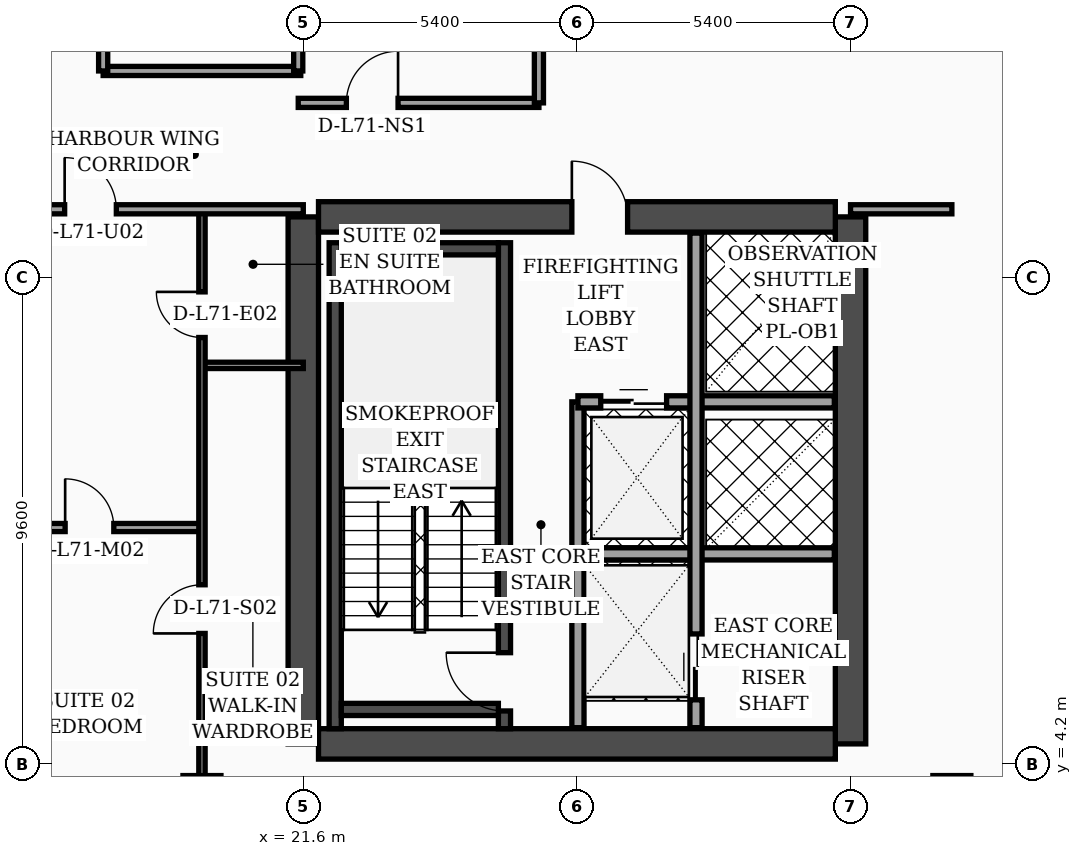
"""IFC4 building model, lengths in metres.
Left out: names, types, materials, properties, quantities, classifications, styles, units other than length and angle.
Written with IfcOpenShell. Run it as: python <this file> out.ifc"""

import sys

from ifc_helpers import new_model, si_unit, direction, frame, frame_2d, origin, origin_2d, place, context, subcontext, project, spatial, rectangle, hollow_rectangle, extrude, element, fill, save


model = new_model("IFC4")
c1 = context("Model", 3, precision=1e-05, world=origin(), true_north=direction((0.0, 1.0)))
c2 = subcontext(c1, "Body", "Model", "MODEL_VIEW")
j1 = project(units=[si_unit("LENGTHUNIT", "METRE"), si_unit("PLANEANGLEUNIT", "RADIAN")], contexts=[c1])
p1 = place(None, origin())
s1 = spatial("IfcSite", under=j1, at=p1, CompositionType="ELEMENT")
p2 = place(p1, origin())
s2 = spatial("IfcBuilding", under=s1, at=p2, CompositionType="ELEMENT")
p3 = place(p2, frame((0.0, 0.0, 287.3)))
s3 = spatial("IfcBuildingStorey", under=s2, at=p3, CompositionType="ELEMENT", Elevation=287.3)
for number, where, z_axis, x_axis in (
    (1, (21.6, 4.6, 0.0), (0.0, 0.0, 1.0), (0.0, 1.0, 0.0)),
    (2, (32.4, 4.6, 0.0), (0.0, 0.0, 1.0), (0.0, 1.0, 0.0)),
):
    element("IfcWall", number, at=place(p3, frame(where, z_axis=z_axis, x_axis=x_axis)), inside=s3, PredefinedType="SHEAR", context=c2, shape_type="SweptSolid", body=[
        extrude(rectangle(XDim=10.4, YDim=0.6, at=frame_2d((5.2, 0.0))), origin(), (0.0, 0.0, 1.0), 3.56),
    ])
p4 = place(p3, frame((21.9, 15.0, 0.0), z_axis=(0.0, 0.0, 1.0), x_axis=(1.0, 0.0, 0.0)))
e3 = element("IfcWall", 3, at=p4, inside=s3, PredefinedType="SHEAR", context=c2, shape_type="SweptSolid", body=[
    extrude(rectangle(XDim=10.2, YDim=0.6, at=frame_2d((5.1, 0.0))), origin(), (0.0, 0.0, 1.0), 3.56),
])
p5 = place(p4, frame((5.0, 0.0, 0.0)))
e4 = element("IfcOpeningElement", 4, at=p5, cuts=e3, PredefinedType="OPENING", context=c2, shape_type="SweptSolid", body=[
    extrude(rectangle(XDim=1.1, YDim=2.2, at=frame_2d((0.55, 1.1))), frame((0.0, 0.31, 0.0), z_axis=(0.0, -1.0, 0.0), x_axis=(1.0, 0.0, 0.0)), (0.0, 0.0, 1.0), 0.62),
])
p6 = place(p3, frame((21.9, 4.6, 0.0), z_axis=(0.0, 0.0, 1.0), x_axis=(1.0, 0.0, 0.0)))
e5 = element("IfcWall", 5, at=p6, inside=s3, PredefinedType="SHEAR", context=c2, shape_type="SweptSolid", body=[
    extrude(rectangle(XDim=10.2, YDim=0.6, at=frame_2d((5.1, 0.0))), origin(), (0.0, 0.0, 1.0), 3.56),
])
p7 = place(p3, frame((22.23, 4.9, 0.0), z_axis=(0.0, 0.0, 1.0), x_axis=(0.0, 1.0, 0.0)))
e6 = element("IfcWall", 6, at=p7, inside=s3, PredefinedType="SOLIDWALL", context=c2, shape_type="SweptSolid", body=[
    extrude(rectangle(XDim=9.59, YDim=0.24, at=frame_2d((4.795, 0.0))), origin(), (0.0, 0.0, 1.0), 3.56),
])
p8 = place(p3, frame((25.57, 4.9, 0.0), z_axis=(0.0, 0.0, 1.0), x_axis=(0.0, 1.0, 0.0)))
e7 = element("IfcWall", 7, at=p8, inside=s3, PredefinedType="SOLIDWALL", context=c2, shape_type="SweptSolid", body=[
    extrude(rectangle(XDim=9.59, YDim=0.24, at=frame_2d((4.795, 0.0))), origin(), (0.0, 0.0, 1.0), 3.56),
])
p9 = place(p8, frame((0.35, 0.0, 0.0)))
e8 = element("IfcOpeningElement", 8, at=p9, cuts=e7, PredefinedType="OPENING", context=c2, shape_type="SweptSolid", body=[
    extrude(rectangle(XDim=1.15, YDim=2.2, at=frame_2d((0.575, 1.1))), frame((0.0, 0.13, 0.0), z_axis=(0.0, -1.0, 0.0), x_axis=(1.0, 0.0, 0.0)), (0.0, 0.0, 1.0), 0.26),
])
for number, where, z_axis, x_axis in (
    (9, (22.35, 5.28, 0.0), (0.0, 0.0, 1.0), (1.0, 0.0, 0.0)),
    (10, (22.35, 14.37, 0.0), (0.0, 0.0, 1.0), (1.0, 0.0, 0.0)),
):
    element("IfcWall", number, at=place(p3, frame(where, z_axis=z_axis, x_axis=x_axis)), inside=s3, PredefinedType="SOLIDWALL", context=c2, shape_type="SweptSolid", body=[
        extrude(rectangle(XDim=3.1, YDim=0.24, at=frame_2d((1.55, 0.0))), origin(), (0.0, 0.0, 1.0), 3.56),
    ])
for number, where, z_axis, x_axis in (
    (11, (19.6, 3.6, 0.0), (0.0, 0.0, 1.0), (1.0, 0.0, 0.0)),
    (12, (34.4, 3.6, 0.0), (0.0, 0.0, 1.0), (1.0, 0.0, 0.0)),
):
    element("IfcColumn", number, at=place(p3, frame(where, z_axis=z_axis, x_axis=x_axis)), inside=s3, PredefinedType="COLUMN", context=c2, shape_type="SweptSolid", body=[
        extrude(hollow_rectangle(XDim=0.75, YDim=0.75, WallThickness=0.032, at=origin_2d()), origin(), (0.0, 0.0, 1.0), 3.56),
    ])
p10 = place(p3, frame((41.03, 5.505, 0.0), z_axis=(0.0, 0.0, 1.0), x_axis=(-0.300509063924, 0.953778958931, 0.0)))
e13 = element("IfcWall", 13, at=p10, inside=s3, PredefinedType="SOLIDWALL", context=c2, shape_type="SweptSolid", body=[
    extrude(rectangle(XDim=30.814, YDim=0.32, at=frame_2d((15.407, 0.0))), origin(), (0.0, 0.0, 1.0), 3.56),
])
p11 = place(p10, frame((8.9, 0.0, 0.0)))
e14 = element("IfcOpeningElement", 14, at=p11, cuts=e13, PredefinedType="OPENING", context=c2, shape_type="SweptSolid", body=[
    extrude(rectangle(XDim=1.4, YDim=2.25, at=frame_2d((0.7, 1.125))), frame((0.0, 0.17, 0.0), z_axis=(0.0, -1.0, 0.0), x_axis=(1.0, 0.0, 0.0)), (0.0, 0.0, 1.0), 0.34),
])
p12 = place(p10, frame((4.437, 0.0, 0.7)))
e15 = element("IfcOpeningElement", 15, at=p12, cuts=e13, PredefinedType="OPENING", context=c2, shape_type="SweptSolid", body=[
    extrude(rectangle(XDim=1.6, YDim=1.65, at=frame_2d((0.8, 0.825))), frame((0.0, 0.17, 0.0), z_axis=(0.0, -1.0, 0.0), x_axis=(1.0, 0.0, 0.0)), (0.0, 0.0, 1.0), 0.34),
])
p13 = place(p10, frame((18.696, 0.0, 0.7)))
e16 = element("IfcOpeningElement", 16, at=p13, cuts=e13, PredefinedType="OPENING", context=c2, shape_type="SweptSolid", body=[
    extrude(rectangle(XDim=1.6, YDim=1.65, at=frame_2d((0.8, 0.825))), frame((0.0, 0.17, 0.0), z_axis=(0.0, -1.0, 0.0), x_axis=(1.0, 0.0, 0.0)), (0.0, 0.0, 1.0), 0.34),
])
p14 = place(p10, frame((1.6, 0.0, 0.75)))
e17 = element("IfcOpeningElement", 17, at=p14, cuts=e13, PredefinedType="OPENING", context=c2, shape_type="SweptSolid", body=[
    extrude(rectangle(XDim=1.5, YDim=1.6, at=frame_2d((0.75, 0.8))), frame((0.0, 0.17, 0.0), z_axis=(0.0, -1.0, 0.0), x_axis=(1.0, 0.0, 0.0)), (0.0, 0.0, 1.0), 0.34),
])
p15 = place(p10, frame((6.75, 0.0, 0.75)))
e18 = element("IfcOpeningElement", 18, at=p15, cuts=e13, PredefinedType="OPENING", context=c2, shape_type="SweptSolid", body=[
    extrude(rectangle(XDim=1.5, YDim=1.6, at=frame_2d((0.75, 0.8))), frame((0.0, 0.17, 0.0), z_axis=(0.0, -1.0, 0.0), x_axis=(1.0, 0.0, 0.0)), (0.0, 0.0, 1.0), 0.34),
])
p16 = place(p10, frame((10.9, 0.0, 0.75)))
e19 = element("IfcOpeningElement", 19, at=p16, cuts=e13, PredefinedType="OPENING", context=c2, shape_type="SweptSolid", body=[
    extrude(rectangle(XDim=1.5, YDim=1.6, at=frame_2d((0.75, 0.8))), frame((0.0, 0.17, 0.0), z_axis=(0.0, -1.0, 0.0), x_axis=(1.0, 0.0, 0.0)), (0.0, 0.0, 1.0), 0.34),
])
p17 = place(p10, frame((14.0, 0.0, 0.75)))
e20 = element("IfcOpeningElement", 20, at=p17, cuts=e13, PredefinedType="OPENING", context=c2, shape_type="SweptSolid", body=[
    extrude(rectangle(XDim=1.5, YDim=1.6, at=frame_2d((0.75, 0.8))), frame((0.0, 0.17, 0.0), z_axis=(0.0, -1.0, 0.0), x_axis=(1.0, 0.0, 0.0)), (0.0, 0.0, 1.0), 0.34),
])
p18 = place(p10, frame((16.55, 0.0, 0.75)))
e21 = element("IfcOpeningElement", 21, at=p18, cuts=e13, PredefinedType="OPENING", context=c2, shape_type="SweptSolid", body=[
    extrude(rectangle(XDim=1.5, YDim=1.6, at=frame_2d((0.75, 0.8))), frame((0.0, 0.17, 0.0), z_axis=(0.0, -1.0, 0.0), x_axis=(1.0, 0.0, 0.0)), (0.0, 0.0, 1.0), 0.34),
])
p19 = place(p10, frame((20.75, 0.0, 0.75)))
e22 = element("IfcOpeningElement", 22, at=p19, cuts=e13, PredefinedType="OPENING", context=c2, shape_type="SweptSolid", body=[
    extrude(rectangle(XDim=1.5, YDim=1.6, at=frame_2d((0.75, 0.8))), frame((0.0, 0.17, 0.0), z_axis=(0.0, -1.0, 0.0), x_axis=(1.0, 0.0, 0.0)), (0.0, 0.0, 1.0), 0.34),
])
p20 = place(p10, frame((23.3, 0.0, 0.75)))
e23 = element("IfcOpeningElement", 23, at=p20, cuts=e13, PredefinedType="OPENING", context=c2, shape_type="SweptSolid", body=[
    extrude(rectangle(XDim=1.5, YDim=1.6, at=frame_2d((0.75, 0.8))), frame((0.0, 0.17, 0.0), z_axis=(0.0, -1.0, 0.0), x_axis=(1.0, 0.0, 0.0)), (0.0, 0.0, 1.0), 0.34),
])
p21 = place(p10, frame((26.4, 0.0, 0.75)))
e24 = element("IfcOpeningElement", 24, at=p21, cuts=e13, PredefinedType="OPENING", context=c2, shape_type="SweptSolid", body=[
    extrude(rectangle(XDim=1.5, YDim=1.6, at=frame_2d((0.75, 0.8))), frame((0.0, 0.17, 0.0), z_axis=(0.0, -1.0, 0.0), x_axis=(1.0, 0.0, 0.0)), (0.0, 0.0, 1.0), 0.34),
])
p22 = place(p3, frame((27.02, 4.92, 0.0), z_axis=(0.0, 0.0, 1.0), x_axis=(0.0, 1.0, 0.0)))
e25 = element("IfcWall", 25, at=p22, inside=s3, PredefinedType="SOLIDWALL", context=c2, shape_type="SweptSolid", body=[
    extrude(rectangle(XDim=6.43, YDim=0.24, at=frame_2d((3.215, 0.0))), origin(), (0.0, 0.0, 1.0), 3.56),
])
p23 = place(p3, frame((27.02, 11.35, 0.0), z_axis=(0.0, 0.0, 1.0), x_axis=(1.0, 0.0, 0.0)))
e26 = element("IfcWall", 26, at=p23, inside=s3, PredefinedType="SOLIDWALL", context=c2, shape_type="SweptSolid", body=[
    extrude(rectangle(XDim=5.06, YDim=0.24, at=frame_2d((2.53, 0.0))), origin(), (0.0, 0.0, 1.0), 3.56),
])
p24 = place(p23, frame((0.45, 0.0, 0.0)))
e27 = element("IfcOpeningElement", 27, at=p24, cuts=e26, PredefinedType="OPENING", context=c2, shape_type="SweptSolid", body=[
    extrude(rectangle(XDim=1.3, YDim=2.35, at=frame_2d((0.65, 1.175))), frame((0.0, 0.13, 0.0), z_axis=(0.0, -1.0, 0.0), x_axis=(1.0, 0.0, 0.0)), (0.0, 0.0, 1.0), 0.26),
])
p25 = place(p3, frame((27.02, 8.35, 0.0), z_axis=(0.0, 0.0, 1.0), x_axis=(1.0, 0.0, 0.0)))
e28 = element("IfcWall", 28, at=p25, inside=s3, PredefinedType="SOLIDWALL", context=c2, shape_type="SweptSolid", body=[
    extrude(rectangle(XDim=5.06, YDim=0.24, at=frame_2d((2.53, 0.0))), origin(), (0.0, 0.0, 1.0), 3.09),
])
p26 = place(p3, frame((29.35, 4.92, 0.0), z_axis=(0.0, 0.0, 1.0), x_axis=(0.0, 1.0, 0.0)))
e29 = element("IfcWall", 29, at=p26, inside=s3, PredefinedType="SOLIDWALL", context=c2, shape_type="SweptSolid", body=[
    extrude(rectangle(XDim=9.76, YDim=0.24, at=frame_2d((4.88, 0.0))), origin(), (0.0, 0.0, 1.0), 3.56),
])
p27 = place(p26, frame((0.55, 0.0, 0.0)))
e30 = element("IfcOpeningElement", 30, at=p27, cuts=e29, PredefinedType="OPENING", context=c2, shape_type="SweptSolid", body=[
    extrude(rectangle(XDim=1.3, YDim=2.35, at=frame_2d((0.65, 1.175))), frame((0.0, 0.13, 0.0), z_axis=(0.0, -1.0, 0.0), x_axis=(1.0, 0.0, 0.0)), (0.0, 0.0, 1.0), 0.26),
])
p28 = place(p3, frame((19.6, 12.07, 0.0), z_axis=(0.0, 0.0, 1.0), x_axis=(1.0, 0.0, 0.0)))
e31 = element("IfcWall", 31, at=p28, inside=s3, PredefinedType="PARTITIONING", context=c2, shape_type="SweptSolid", body=[
    extrude(rectangle(XDim=2.0, YDim=0.125, at=frame_2d((1.0, 0.0))), origin(), (0.0, 0.0, 1.0), 3.56),
])
p29 = place(p3, frame((15.15, 8.87, 0.0), z_axis=(0.0, 0.0, 1.0), x_axis=(1.0, 0.0, 0.0)))
e32 = element("IfcWall", 32, at=p29, inside=s3, PredefinedType="PARTITIONING", context=c2, shape_type="SweptSolid", body=[
    extrude(rectangle(XDim=4.45, YDim=0.16, at=frame_2d((2.225, 0.0))), origin(), (0.0, 0.0, 1.0), 3.56),
])
p30 = place(p29, frame((1.75, 0.0, 0.0)))
e33 = element("IfcOpeningElement", 33, at=p30, cuts=e32, PredefinedType="OPENING", context=c2, shape_type="SweptSolid", body=[
    extrude(rectangle(XDim=0.96, YDim=2.2, at=frame_2d((0.48, 1.1))), frame((0.0, 0.09, 0.0), z_axis=(0.0, -1.0, 0.0), x_axis=(1.0, 0.0, 0.0)), (0.0, 0.0, 1.0), 0.18),
])
p31 = place(p3, frame((19.6, 2.44, 0.0), z_axis=(0.0, 0.0, 1.0), x_axis=(0.0, 1.0, 0.0)))
e34 = element("IfcWall", 34, at=p31, inside=s3, PredefinedType="PARTITIONING", context=c2, shape_type="SweptSolid", body=[
    extrude(rectangle(XDim=12.71, YDim=0.125, at=frame_2d((6.355, 0.0))), origin(), (0.0, 0.0, 1.0), 2.59),
])
p32 = place(p31, frame((4.34, 0.0, 0.0)))
e35 = element("IfcOpeningElement", 35, at=p32, cuts=e34, PredefinedType="OPENING", context=c2, shape_type="SweptSolid", body=[
    extrude(rectangle(XDim=0.96, YDim=2.2, at=frame_2d((0.48, 1.1))), frame((0.0, 0.073, 0.0), z_axis=(0.0, -1.0, 0.0), x_axis=(1.0, 0.0, 0.0)), (0.0, 0.0, 1.0), 0.145),
])
p33 = place(p31, frame((10.18, 0.0, 0.0)))
e36 = element("IfcOpeningElement", 36, at=p33, cuts=e34, PredefinedType="OPENING", context=c2, shape_type="SweptSolid", body=[
    extrude(rectangle(XDim=0.9, YDim=2.15, at=frame_2d((0.45, 1.075))), frame((0.0, 0.073, 0.0), z_axis=(0.0, -1.0, 0.0), x_axis=(1.0, 0.0, 0.0)), (0.0, 0.0, 1.0), 0.145),
])
p34 = place(p3, frame((15.15, 15.15, 0.0), z_axis=(0.0, 0.0, 1.0), x_axis=(1.0, 0.0, 0.0)))
e37 = element("IfcWall", 37, at=p34, inside=s3, PredefinedType="PARTITIONING", context=c2, shape_type="SweptSolid", body=[
    extrude(rectangle(XDim=6.45, YDim=0.18, at=frame_2d((3.225, 0.0))), origin(), (0.0, 0.0, 1.0), 2.59),
])
p35 = place(p34, frame((1.74, 0.0, 0.0)))
e38 = element("IfcOpeningElement", 38, at=p35, cuts=e37, PredefinedType="OPENING", context=c2, shape_type="SweptSolid", body=[
    extrude(rectangle(XDim=1.02, YDim=2.2, at=frame_2d((0.51, 1.1))), frame((0.0, 0.1, 0.0), z_axis=(0.0, -1.0, 0.0), x_axis=(1.0, 0.0, 0.0)), (0.0, 0.0, 1.0), 0.2),
])
p36 = place(p3, frame((17.65, 17.88, 0.0), z_axis=(0.0, 0.0, 1.0), x_axis=(1.0, 0.0, 0.0)))
e39 = element("IfcWall", 39, at=p36, inside=s3, PredefinedType="PARTITIONING", context=c2, shape_type="SweptSolid", body=[
    extrude(rectangle(XDim=3.9, YDim=0.18, at=frame_2d((1.95, 0.0))), origin(), (0.0, 0.0, 1.0), 3.56),
])
p37 = place(p3, frame((21.5, 17.88, 0.0), z_axis=(0.0, 0.0, 1.0), x_axis=(0.0, 1.0, 0.0)))
e40 = element("IfcWall", 40, at=p37, inside=s3, PredefinedType="PARTITIONING", context=c2, shape_type="SweptSolid", body=[
    extrude(rectangle(XDim=6.44, YDim=0.18, at=frame_2d((3.22, 0.0))), origin(), (0.0, 0.0, 1.0), 3.56),
])
p38 = place(p3, frame((17.65, 17.88, 0.0), z_axis=(0.0, 0.0, 1.0), x_axis=(0.0, 1.0, 0.0)))
e41 = element("IfcWall", 41, at=p38, inside=s3, PredefinedType="PARTITIONING", context=c2, shape_type="SweptSolid", body=[
    extrude(rectangle(XDim=6.44, YDim=0.18, at=frame_2d((3.22, 0.0))), origin(), (0.0, 0.0, 1.0), 3.56),
])
p39 = place(p38, frame((0.65, 0.0, 0.0)))
e42 = element("IfcOpeningElement", 42, at=p39, cuts=e41, PredefinedType="OPENING", context=c2, shape_type="SweptSolid", body=[
    extrude(rectangle(XDim=0.98, YDim=2.15, at=frame_2d((0.49, 1.075))), frame((0.0, 0.1, 0.0), z_axis=(0.0, -1.0, 0.0), x_axis=(1.0, 0.0, 0.0)), (0.0, 0.0, 1.0), 0.2),
])
p40 = place(p38, frame((3.97, 0.0, 0.0)))
e43 = element("IfcOpeningElement", 43, at=p40, cuts=e41, PredefinedType="OPENING", context=c2, shape_type="SweptSolid", body=[
    extrude(rectangle(XDim=0.96, YDim=2.2, at=frame_2d((0.48, 1.1))), frame((0.0, 0.1, 0.0), z_axis=(0.0, -1.0, 0.0), x_axis=(1.0, 0.0, 0.0)), (0.0, 0.0, 1.0), 0.2),
])
p41 = place(p3, frame((32.4, 15.15, 0.0), z_axis=(0.0, 0.0, 1.0), x_axis=(1.0, 0.0, 0.0)))
e44 = element("IfcWall", 44, at=p41, inside=s3, PredefinedType="PARTITIONING", context=c2, shape_type="SweptSolid", body=[
    extrude(rectangle(XDim=2.0, YDim=0.18, at=frame_2d((1.0, 0.0))), origin(), (0.0, 0.0, 1.0), 2.99),
])
p42 = place(p3, frame((21.5, 17.25, 0.0), z_axis=(0.0, 0.0, 1.0), x_axis=(1.0, 0.0, 0.0)))
e45 = element("IfcWall", 45, at=p42, inside=s3, PredefinedType="PARTITIONING", context=c2, shape_type="SweptSolid", body=[
    extrude(rectangle(XDim=4.75, YDim=0.18, at=frame_2d((2.375, 0.0))), origin(), (0.0, 0.0, 1.0), 3.56),
])
p43 = place(p42, frame((0.95, 0.0, 0.0)))
e46 = element("IfcOpeningElement", 46, at=p43, cuts=e45, PredefinedType="OPENING", context=c2, shape_type="SweptSolid", body=[
    extrude(rectangle(XDim=1.02, YDim=2.2, at=frame_2d((0.51, 1.1))), frame((0.0, 0.1, 0.0), z_axis=(0.0, -1.0, 0.0), x_axis=(1.0, 0.0, 0.0)), (0.0, 0.0, 1.0), 0.2),
])
p44 = place(p3, frame((26.25, 17.25, 0.0), z_axis=(0.0, 0.0, 1.0), x_axis=(0.0, 1.0, 0.0)))
e47 = element("IfcWall", 47, at=p44, inside=s3, PredefinedType="PARTITIONING", context=c2, shape_type="SweptSolid", body=[
    extrude(rectangle(XDim=17.43, YDim=0.18, at=frame_2d((8.715, 0.0))), origin(), (0.0, 0.0, 1.0), 3.09),
])
p45 = place(p24, origin())
e48 = element("IfcDoor", 48, at=p45, inside=s3, OperationType="DOUBLE_DOOR_SLIDING", PredefinedType="DOOR", context=c2, shape_type="SweptSolid", body=[
    extrude(rectangle(XDim=1.3, YDim=2.35, at=frame_2d((0.65, 1.175))), frame((0.0, 0.025, 0.0), z_axis=(0.0, -1.0, 0.0), x_axis=(1.0, 0.0, 0.0)), (0.0, 0.0, 1.0), 0.05),
])
fill(e27, e48)
p46 = place(p27, origin())
e49 = element("IfcDoor", 49, at=p46, inside=s3, OperationType="DOUBLE_DOOR_SLIDING", PredefinedType="DOOR", context=c2, shape_type="SweptSolid", body=[
    extrude(rectangle(XDim=1.3, YDim=2.35, at=frame_2d((0.65, 1.175))), frame((0.0, 0.025, 0.0), z_axis=(0.0, -1.0, 0.0), x_axis=(1.0, 0.0, 0.0)), (0.0, 0.0, 1.0), 0.05),
])
fill(e30, e49)
p47 = place(p30, origin())
e50 = element("IfcDoor", 50, at=p47, inside=s3, OperationType="SINGLE_SWING_LEFT", PredefinedType="DOOR", context=c2, shape_type="SweptSolid", body=[
    extrude(rectangle(XDim=0.96, YDim=2.2, at=frame_2d((0.48, 1.1))), frame((0.0, 0.025, 0.0), z_axis=(0.0, -1.0, 0.0), x_axis=(1.0, 0.0, 0.0)), (0.0, 0.0, 1.0), 0.05),
])
fill(e33, e50)
p48 = place(p32, origin())
e51 = element("IfcDoor", 51, at=p48, inside=s3, OperationType="SINGLE_SWING_LEFT", PredefinedType="DOOR", context=c2, shape_type="SweptSolid", body=[
    extrude(rectangle(XDim=0.96, YDim=2.2, at=frame_2d((0.48, 1.1))), frame((0.0, 0.025, 0.0), z_axis=(0.0, -1.0, 0.0), x_axis=(1.0, 0.0, 0.0)), (0.0, 0.0, 1.0), 0.05),
])
fill(e35, e51)
p49 = place(p33, origin())
e52 = element("IfcDoor", 52, at=p49, inside=s3, OperationType="SINGLE_SWING_RIGHT", PredefinedType="DOOR", context=c2, shape_type="SweptSolid", body=[
    extrude(rectangle(XDim=0.9, YDim=2.15, at=frame_2d((0.45, 1.075))), frame((0.0, 0.025, 0.0), z_axis=(0.0, -1.0, 0.0), x_axis=(1.0, 0.0, 0.0)), (0.0, 0.0, 1.0), 0.05),
])
fill(e36, e52)
p50 = place(p35, origin())
e53 = element("IfcDoor", 53, at=p50, inside=s3, OperationType="SINGLE_SWING_LEFT", PredefinedType="DOOR", context=c2, shape_type="SweptSolid", body=[
    extrude(rectangle(XDim=1.02, YDim=2.2, at=frame_2d((0.51, 1.1))), frame((0.0, 0.025, 0.0), z_axis=(0.0, -1.0, 0.0), x_axis=(1.0, 0.0, 0.0)), (0.0, 0.0, 1.0), 0.05),
])
fill(e38, e53)
p51 = place(p43, origin())
e54 = element("IfcDoor", 54, at=p51, inside=s3, OperationType="SINGLE_SWING_RIGHT", PredefinedType="DOOR", context=c2, shape_type="SweptSolid", body=[
    extrude(rectangle(XDim=1.02, YDim=2.2, at=frame_2d((0.51, 1.1))), frame((0.0, 0.025, 0.0), z_axis=(0.0, -1.0, 0.0), x_axis=(1.0, 0.0, 0.0)), (0.0, 0.0, 1.0), 0.05),
])
fill(e46, e54)
p52 = place(p9, origin())
e55 = element("IfcDoor", 55, at=p52, inside=s3, OperationType="SINGLE_SWING_RIGHT", PredefinedType="DOOR", context=c2, shape_type="SweptSolid", body=[
    extrude(rectangle(XDim=1.15, YDim=2.2, at=frame_2d((0.575, 1.1))), frame((0.0, 0.025, 0.0), z_axis=(0.0, -1.0, 0.0), x_axis=(1.0, 0.0, 0.0)), (0.0, 0.0, 1.0), 0.05),
])
fill(e8, e55)
p53 = place(p5, origin())
e56 = element("IfcDoor", 56, at=p53, inside=s3, OperationType="SINGLE_SWING_LEFT", PredefinedType="DOOR", context=c2, shape_type="SweptSolid", body=[
    extrude(rectangle(XDim=1.1, YDim=2.2, at=frame_2d((0.55, 1.1))), frame((0.0, 0.025, 0.0), z_axis=(0.0, -1.0, 0.0), x_axis=(1.0, 0.0, 0.0)), (0.0, 0.0, 1.0), 0.05),
])
fill(e4, e56)
save(model, sys.argv[1])
